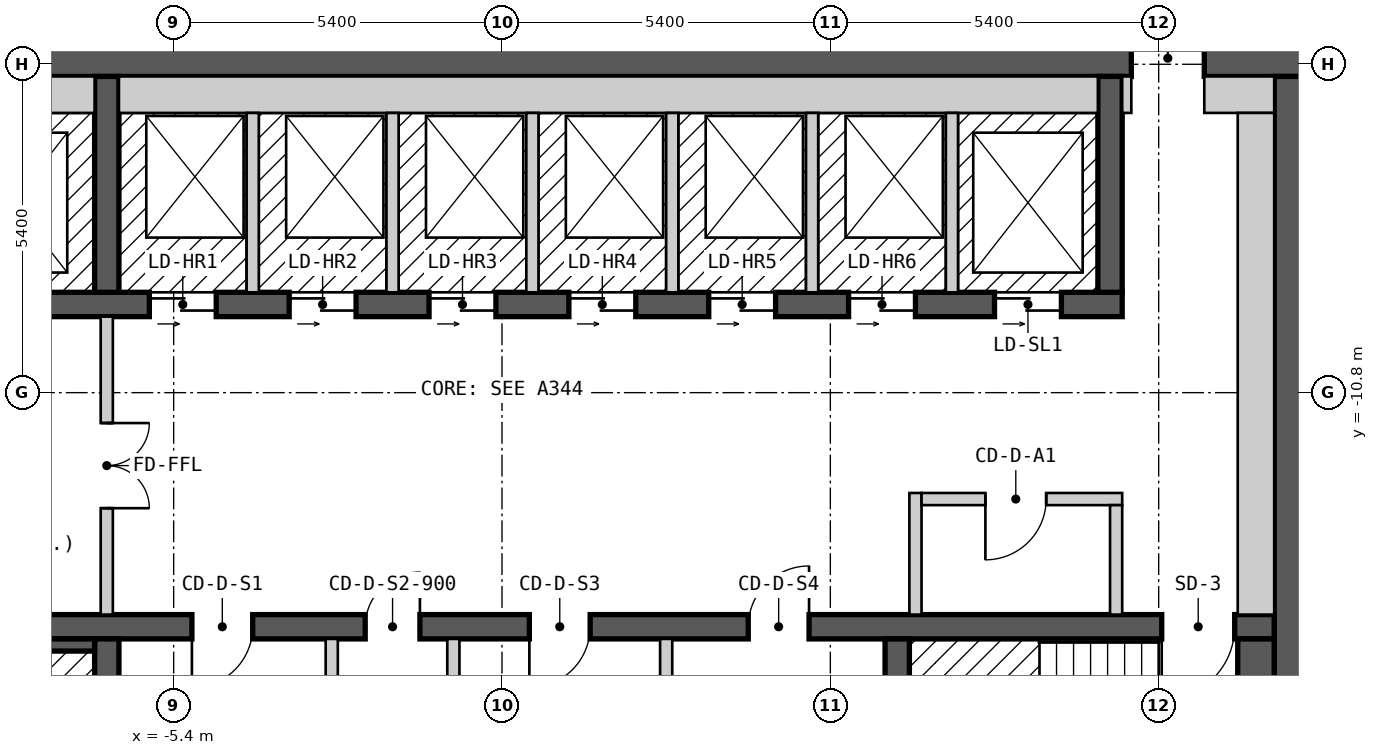
"""IFC4 building model, lengths in metres.
Left out: names, types, materials, properties, quantities, classifications, styles, units other than length and angle.
Written with IfcOpenShell. Run it as: python <this file> out.ifc"""

import sys

from ifc_helpers import new_model, si_unit, direction, frame, frame_2d, origin, place, context, subcontext, project, spatial, rectangle, extrude, element, fill, save


model = new_model("IFC4")
c1 = context("Model", 3, precision=1e-05, world=origin(), true_north=direction((0.0, 1.0)))
c2 = subcontext(c1, "Body", "Model", "MODEL_VIEW")
j1 = project(units=[si_unit("LENGTHUNIT", "METRE"), si_unit("PLANEANGLEUNIT", "RADIAN")], contexts=[c1])
p1 = place(None, origin())
s1 = spatial("IfcSite", under=j1, at=p1, CompositionType="ELEMENT")
p2 = place(p1, origin())
s2 = spatial("IfcBuilding", under=s1, at=p2, CompositionType="ELEMENT")
p3 = place(p2, frame((0.0, 0.0, 163.2)))
s3 = spatial("IfcBuildingStorey", under=s2, at=p3, CompositionType="ELEMENT", Elevation=163.2)
p4 = place(p3, frame((-13.3, -5.3, 0.0), z_axis=(0.0, 0.0, 1.0), x_axis=(1.0, 0.0, 0.0)))
e1 = element("IfcWall", 1, at=p4, inside=s3, PredefinedType="SHEAR", context=c2, shape_type="SweptSolid", body=[
    extrude(rectangle(XDim=26.6, YDim=0.6, at=frame_2d((13.3, 0.0))), origin(), (0.0, 0.0, 1.0), 2.7),
])
p5 = place(p4, frame((23.65, 0.0, 0.0)))
e2 = element("IfcOpeningElement", 2, at=p5, cuts=e1, PredefinedType="OPENING", context=c2, shape_type="SweptSolid", body=[
    extrude(rectangle(XDim=1.2, YDim=2.1, at=frame_2d((0.6, 1.05))), frame((0.0, 0.31, 0.0), z_axis=(0.0, -1.0, 0.0), x_axis=(1.0, 0.0, 0.0)), (0.0, 0.0, 1.0), 0.62),
])
p6 = place(p3, frame((13.0, -18.4, 0.0), z_axis=(0.0, 0.0, 1.0), x_axis=(0.0, 1.0, 0.0)))
e3 = element("IfcWall", 3, at=p6, inside=s3, PredefinedType="SHEAR", context=c2, shape_type="SweptSolid", body=[
    extrude(rectangle(XDim=12.8, YDim=0.6, at=frame_2d((6.4, 0.0))), origin(), (0.0, 0.0, 1.0), 2.7),
])
p7 = place(p3, frame((-12.7, -14.65, 0.0), z_axis=(0.0, 0.0, 1.0), x_axis=(1.0, 0.0, 0.0)))
e4 = element("IfcWall", 4, at=p7, inside=s3, PredefinedType="SHEAR", context=c2, shape_type="SweptSolid", body=[
    extrude(rectangle(XDim=25.4, YDim=0.4, at=frame_2d((12.7, 0.0))), origin(), (0.0, 0.0, 1.0), 2.7),
])
p8 = place(p7, frame((1.9, 0.0, 0.0), z_axis=(0.0, 0.0, 1.0), x_axis=(-1.0, 0.0, 0.0)))
e5 = element("IfcOpeningElement", 5, at=p8, cuts=e4, PredefinedType="OPENING", context=c2, shape_type="SweptSolid", body=[
    extrude(rectangle(XDim=1.2, YDim=2.1, at=frame_2d((0.6, 1.05))), frame((0.0, 0.21, 0.0), z_axis=(0.0, -1.0, 0.0), x_axis=(1.0, 0.0, 0.0)), (0.0, 0.0, 1.0), 0.42),
])
p9 = place(p7, frame((24.75, 0.0, 0.0), z_axis=(0.0, 0.0, 1.0), x_axis=(-1.0, 0.0, 0.0)))
e6 = element("IfcOpeningElement", 6, at=p9, cuts=e4, PredefinedType="OPENING", context=c2, shape_type="SweptSolid", body=[
    extrude(rectangle(XDim=1.2, YDim=2.1, at=frame_2d((0.6, 1.05))), frame((0.0, 0.21, 0.0), z_axis=(0.0, -1.0, 0.0), x_axis=(1.0, 0.0, 0.0)), (0.0, 0.0, 1.0), 0.42),
])
p10 = place(p7, frame((8.6, 0.0, 0.0), z_axis=(0.0, 0.0, 1.0), x_axis=(-1.0, 0.0, 0.0)))
e7 = element("IfcOpeningElement", 7, at=p10, cuts=e4, PredefinedType="OPENING", context=c2, shape_type="SweptSolid", body=[
    extrude(rectangle(XDim=1.0, YDim=2.1, at=frame_2d((0.5, 1.05))), frame((0.0, 0.21, 0.0), z_axis=(0.0, -1.0, 0.0), x_axis=(1.0, 0.0, 0.0)), (0.0, 0.0, 1.0), 0.42),
])
p11 = place(p7, frame((11.35, 0.0, 0.0), z_axis=(0.0, 0.0, 1.0), x_axis=(-1.0, 0.0, 0.0)))
e8 = element("IfcOpeningElement", 8, at=p11, cuts=e4, PredefinedType="OPENING", context=c2, shape_type="SweptSolid", body=[
    extrude(rectangle(XDim=0.9, YDim=2.1, at=frame_2d((0.45, 1.05))), frame((0.0, 0.21, 0.0), z_axis=(0.0, -1.0, 0.0), x_axis=(1.0, 0.0, 0.0)), (0.0, 0.0, 1.0), 0.42),
])
p12 = place(p7, frame((14.15, 0.0, 0.0), z_axis=(0.0, 0.0, 1.0), x_axis=(-1.0, 0.0, 0.0)))
e9 = element("IfcOpeningElement", 9, at=p12, cuts=e4, PredefinedType="OPENING", context=c2, shape_type="SweptSolid", body=[
    extrude(rectangle(XDim=1.0, YDim=2.1, at=frame_2d((0.5, 1.05))), frame((0.0, 0.21, 0.0), z_axis=(0.0, -1.0, 0.0), x_axis=(1.0, 0.0, 0.0)), (0.0, 0.0, 1.0), 0.42),
])
p13 = place(p7, frame((17.75, 0.0, 0.0), z_axis=(0.0, 0.0, 1.0), x_axis=(-1.0, 0.0, 0.0)))
e10 = element("IfcOpeningElement", 10, at=p13, cuts=e4, PredefinedType="OPENING", context=c2, shape_type="SweptSolid", body=[
    extrude(rectangle(XDim=1.0, YDim=2.1, at=frame_2d((0.5, 1.05))), frame((0.0, 0.21, 0.0), z_axis=(0.0, -1.0, 0.0), x_axis=(1.0, 0.0, 0.0)), (0.0, 0.0, 1.0), 0.42),
])
p14 = place(p3, frame((-12.7, -9.35, 0.0), z_axis=(0.0, 0.0, 1.0), x_axis=(1.0, 0.0, 0.0)))
e11 = element("IfcWall", 11, at=p14, inside=s3, PredefinedType="SHEAR", context=c2, shape_type="SweptSolid", body=[
    extrude(rectangle(XDim=22.9, YDim=0.4, at=frame_2d((11.45, 0.0))), origin(), (0.0, 0.0, 1.0), 2.7),
])
p15 = place(p14, frame((1.3, 0.0, 0.0)))
e12 = element("IfcOpeningElement", 12, at=p15, cuts=e11, PredefinedType="OPENING", context=c2, shape_type="SweptSolid", body=[
    extrude(rectangle(XDim=1.1, YDim=2.1, at=frame_2d((0.55, 1.05))), frame((0.0, 0.21, 0.0), z_axis=(0.0, -1.0, 0.0), x_axis=(1.0, 0.0, 0.0)), (0.0, 0.0, 1.0), 0.42),
])
p16 = place(p14, frame((4.1, 0.0, 0.0)))
e13 = element("IfcOpeningElement", 13, at=p16, cuts=e11, PredefinedType="OPENING", context=c2, shape_type="SweptSolid", body=[
    extrude(rectangle(XDim=1.1, YDim=2.1, at=frame_2d((0.55, 1.05))), frame((0.0, 0.21, 0.0), z_axis=(0.0, -1.0, 0.0), x_axis=(1.0, 0.0, 0.0)), (0.0, 0.0, 1.0), 0.42),
])
p17 = place(p14, frame((6.9, 0.0, 0.0)))
e14 = element("IfcOpeningElement", 14, at=p17, cuts=e11, PredefinedType="OPENING", context=c2, shape_type="SweptSolid", body=[
    extrude(rectangle(XDim=1.1, YDim=2.1, at=frame_2d((0.55, 1.05))), frame((0.0, 0.21, 0.0), z_axis=(0.0, -1.0, 0.0), x_axis=(1.0, 0.0, 0.0)), (0.0, 0.0, 1.0), 0.42),
])
p18 = place(p14, frame((9.2, 0.0, 0.0)))
e15 = element("IfcOpeningElement", 15, at=p18, cuts=e11, PredefinedType="OPENING", context=c2, shape_type="SweptSolid", body=[
    extrude(rectangle(XDim=1.1, YDim=2.1, at=frame_2d((0.55, 1.05))), frame((0.0, 0.21, 0.0), z_axis=(0.0, -1.0, 0.0), x_axis=(1.0, 0.0, 0.0)), (0.0, 0.0, 1.0), 0.42),
])
p19 = place(p14, frame((11.5, 0.0, 0.0)))
e16 = element("IfcOpeningElement", 16, at=p19, cuts=e11, PredefinedType="OPENING", context=c2, shape_type="SweptSolid", body=[
    extrude(rectangle(XDim=1.1, YDim=2.1, at=frame_2d((0.55, 1.05))), frame((0.0, 0.21, 0.0), z_axis=(0.0, -1.0, 0.0), x_axis=(1.0, 0.0, 0.0)), (0.0, 0.0, 1.0), 0.42),
])
p20 = place(p14, frame((13.8, 0.0, 0.0)))
e17 = element("IfcOpeningElement", 17, at=p20, cuts=e11, PredefinedType="OPENING", context=c2, shape_type="SweptSolid", body=[
    extrude(rectangle(XDim=1.1, YDim=2.1, at=frame_2d((0.55, 1.05))), frame((0.0, 0.21, 0.0), z_axis=(0.0, -1.0, 0.0), x_axis=(1.0, 0.0, 0.0)), (0.0, 0.0, 1.0), 0.42),
])
p21 = place(p14, frame((16.1, 0.0, 0.0)))
e18 = element("IfcOpeningElement", 18, at=p21, cuts=e11, PredefinedType="OPENING", context=c2, shape_type="SweptSolid", body=[
    extrude(rectangle(XDim=1.1, YDim=2.1, at=frame_2d((0.55, 1.05))), frame((0.0, 0.21, 0.0), z_axis=(0.0, -1.0, 0.0), x_axis=(1.0, 0.0, 0.0)), (0.0, 0.0, 1.0), 0.42),
])
p22 = place(p14, frame((18.4, 0.0, 0.0)))
e19 = element("IfcOpeningElement", 19, at=p22, cuts=e11, PredefinedType="OPENING", context=c2, shape_type="SweptSolid", body=[
    extrude(rectangle(XDim=1.1, YDim=2.1, at=frame_2d((0.55, 1.05))), frame((0.0, 0.21, 0.0), z_axis=(0.0, -1.0, 0.0), x_axis=(1.0, 0.0, 0.0)), (0.0, 0.0, 1.0), 0.42),
])
p23 = place(p14, frame((20.8, 0.0, 0.0)))
e20 = element("IfcOpeningElement", 20, at=p23, cuts=e11, PredefinedType="OPENING", context=c2, shape_type="SweptSolid", body=[
    extrude(rectangle(XDim=1.1, YDim=2.1, at=frame_2d((0.55, 1.05))), frame((0.0, 0.21, 0.0), z_axis=(0.0, -1.0, 0.0), x_axis=(1.0, 0.0, 0.0)), (0.0, 0.0, 1.0), 0.42),
])
for number, where, z_axis, x_axis in (
    (21, (-6.5, -18.4, 0.0), (0.0, 0.0, 1.0), (0.0, 1.0, 0.0)),
    (22, (6.5, -18.4, 0.0), (0.0, 0.0, 1.0), (0.0, 1.0, 0.0)),
    (23, (-6.5, -9.15, 0.0), (0.0, 0.0, 1.0), (0.0, 1.0, 0.0)),
    (24, (10.0, -9.15, 0.0), (0.0, 0.0, 1.0), (0.0, 1.0, 0.0)),
):
    element("IfcWall", number, at=place(p3, frame(where, z_axis=z_axis, x_axis=x_axis)), inside=s3, PredefinedType="SHEAR", context=c2, shape_type="SweptSolid", body=[
        extrude(rectangle(XDim=3.55, YDim=0.4, at=frame_2d((1.775, 0.0))), origin(), (0.0, 0.0, 1.0), 2.7),
    ])
p24 = place(p3, frame((-12.1, -5.9, 0.0), z_axis=(0.0, 0.0, 1.0), x_axis=(1.0, 0.0, 0.0)))
e25 = element("IfcWall", 25, at=p24, inside=s3, PredefinedType="SOLIDWALL", context=c2, shape_type="SweptSolid", body=[
    extrude(rectangle(XDim=5.4, YDim=0.6, at=frame_2d((2.7, 0.0))), origin(), (0.0, 0.0, 1.0), 2.7),
])
p25 = place(p3, frame((-10.8, -14.95, 0.0), z_axis=(0.0, 0.0, 1.0), x_axis=(1.0, 0.0, 0.0)))
e26 = element("IfcWall", 26, at=p25, inside=s3, PredefinedType="SOLIDWALL", context=c2, shape_type="SweptSolid", body=[
    extrude(rectangle(XDim=4.1, YDim=0.2, at=frame_2d((2.05, 0.0))), origin(), (0.0, 0.0, 1.0), 2.7),
])
p26 = place(p3, frame((-6.5, -14.45, 0.0), z_axis=(0.0, 0.0, 1.0), x_axis=(0.0, 1.0, 0.0)))
e27 = element("IfcWall", 27, at=p26, inside=s3, PredefinedType="PARTITIONING", context=c2, shape_type="SweptSolid", body=[
    extrude(rectangle(XDim=4.9, YDim=0.2, at=frame_2d((2.45, 0.0))), origin(), (0.0, 0.0, 1.0), 2.7),
])
p27 = place(p26, frame((3.15, 0.0, 0.0), z_axis=(0.0, 0.0, 1.0), x_axis=(-1.0, 0.0, 0.0)))
e28 = element("IfcOpeningElement", 28, at=p27, cuts=e27, PredefinedType="OPENING", context=c2, shape_type="SweptSolid", body=[
    extrude(rectangle(XDim=1.4, YDim=2.1, at=frame_2d((0.7, 1.05))), frame((0.0, 0.11, 0.0), z_axis=(0.0, -1.0, 0.0), x_axis=(1.0, 0.0, 0.0)), (0.0, 0.0, 1.0), 0.22),
])
p28 = place(p3, frame((-6.3, -5.9, 0.0), z_axis=(0.0, 0.0, 1.0), x_axis=(1.0, 0.0, 0.0)))
e29 = element("IfcWall", 29, at=p28, inside=s3, PredefinedType="SOLIDWALL", context=c2, shape_type="SweptSolid", body=[
    extrude(rectangle(XDim=16.1, YDim=0.6, at=frame_2d((8.05, 0.0))), origin(), (0.0, 0.0, 1.0), 2.7),
])
p29 = place(p3, frame((-4.1, -9.15, 0.0), z_axis=(0.0, 0.0, 1.0), x_axis=(0.0, 1.0, 0.0)))
e30 = element("IfcWall", 30, at=p29, inside=s3, PredefinedType="SOLIDWALL", context=c2, shape_type="SweptSolid", body=[
    extrude(rectangle(XDim=2.95, YDim=0.2, at=frame_2d((1.475, 0.0))), origin(), (0.0, 0.0, 1.0), 2.7),
])
p30 = place(p3, frame((-2.8, -17.8, 0.0), z_axis=(0.0, 0.0, 1.0), x_axis=(0.0, 1.0, 0.0)))
e31 = element("IfcWall", 31, at=p30, inside=s3, PredefinedType="PARTITIONING", context=c2, shape_type="SweptSolid", body=[
    extrude(rectangle(XDim=2.95, YDim=0.2, at=frame_2d((1.475, 0.0))), origin(), (0.0, 0.0, 1.0), 2.7),
])
p31 = place(p3, frame((-1.8, -9.15, 0.0), z_axis=(0.0, 0.0, 1.0), x_axis=(0.0, 1.0, 0.0)))
e32 = element("IfcWall", 32, at=p31, inside=s3, PredefinedType="SOLIDWALL", context=c2, shape_type="SweptSolid", body=[
    extrude(rectangle(XDim=2.95, YDim=0.2, at=frame_2d((1.475, 0.0))), origin(), (0.0, 0.0, 1.0), 2.7),
])
p32 = place(p3, frame((-0.8, -17.8, 0.0), z_axis=(0.0, 0.0, 1.0), x_axis=(0.0, 1.0, 0.0)))
e33 = element("IfcWall", 33, at=p32, inside=s3, PredefinedType="PARTITIONING", context=c2, shape_type="SweptSolid", body=[
    extrude(rectangle(XDim=2.95, YDim=0.2, at=frame_2d((1.475, 0.0))), origin(), (0.0, 0.0, 1.0), 2.7),
])
p33 = place(p3, frame((0.5, -9.15, 0.0), z_axis=(0.0, 0.0, 1.0), x_axis=(0.0, 1.0, 0.0)))
e34 = element("IfcWall", 34, at=p33, inside=s3, PredefinedType="SOLIDWALL", context=c2, shape_type="SweptSolid", body=[
    extrude(rectangle(XDim=2.95, YDim=0.2, at=frame_2d((1.475, 0.0))), origin(), (0.0, 0.0, 1.0), 2.7),
])
p34 = place(p3, frame((2.7, -17.8, 0.0), z_axis=(0.0, 0.0, 1.0), x_axis=(0.0, 1.0, 0.0)))
e35 = element("IfcWall", 35, at=p34, inside=s3, PredefinedType="PARTITIONING", context=c2, shape_type="SweptSolid", body=[
    extrude(rectangle(XDim=2.95, YDim=0.2, at=frame_2d((1.475, 0.0))), origin(), (0.0, 0.0, 1.0), 2.7),
])
for number, where, z_axis, x_axis in (
    (36, (2.8, -9.15, 0.0), (0.0, 0.0, 1.0), (0.0, 1.0, 0.0)),
    (37, (5.1, -9.15, 0.0), (0.0, 0.0, 1.0), (0.0, 1.0, 0.0)),
):
    element("IfcWall", number, at=place(p3, frame(where, z_axis=z_axis, x_axis=x_axis)), inside=s3, PredefinedType="SOLIDWALL", context=c2, shape_type="SweptSolid", body=[
        extrude(rectangle(XDim=2.95, YDim=0.2, at=frame_2d((1.475, 0.0))), origin(), (0.0, 0.0, 1.0), 2.7),
    ])
p35 = place(p3, frame((6.8, -14.45, 0.0), z_axis=(0.0, 0.0, 1.0), x_axis=(0.0, 1.0, 0.0)))
e38 = element("IfcWall", 38, at=p35, inside=s3, PredefinedType="PARTITIONING", context=c2, shape_type="SweptSolid", body=[
    extrude(rectangle(XDim=2.0, YDim=0.2, at=frame_2d((1.0, 0.0))), origin(), (0.0, 0.0, 1.0), 2.7),
])
p36 = place(p3, frame((6.9, -12.55, 0.0), z_axis=(0.0, 0.0, 1.0), x_axis=(1.0, 0.0, 0.0)))
e39 = element("IfcWall", 39, at=p36, inside=s3, PredefinedType="PARTITIONING", context=c2, shape_type="SweptSolid", body=[
    extrude(rectangle(XDim=3.3, YDim=0.2, at=frame_2d((1.65, 0.0))), origin(), (0.0, 0.0, 1.0), 2.7),
])
p37 = place(p36, frame((2.05, 0.0, 0.0), z_axis=(0.0, 0.0, 1.0), x_axis=(-1.0, 0.0, 0.0)))
e40 = element("IfcOpeningElement", 40, at=p37, cuts=e39, PredefinedType="OPENING", context=c2, shape_type="SweptSolid", body=[
    extrude(rectangle(XDim=1.0, YDim=2.1, at=frame_2d((0.5, 1.05))), frame((0.0, 0.11, 0.0), z_axis=(0.0, -1.0, 0.0), x_axis=(1.0, 0.0, 0.0)), (0.0, 0.0, 1.0), 0.22),
])
p38 = place(p3, frame((7.4, -9.15, 0.0), z_axis=(0.0, 0.0, 1.0), x_axis=(0.0, 1.0, 0.0)))
e41 = element("IfcWall", 41, at=p38, inside=s3, PredefinedType="SOLIDWALL", context=c2, shape_type="SweptSolid", body=[
    extrude(rectangle(XDim=2.95, YDim=0.2, at=frame_2d((1.475, 0.0))), origin(), (0.0, 0.0, 1.0), 2.7),
])
p39 = place(p3, frame((10.1, -14.45, 0.0), z_axis=(0.0, 0.0, 1.0), x_axis=(0.0, 1.0, 0.0)))
e42 = element("IfcWall", 42, at=p39, inside=s3, PredefinedType="PARTITIONING", context=c2, shape_type="SweptSolid", body=[
    extrude(rectangle(XDim=1.8, YDim=0.2, at=frame_2d((0.9, 0.0))), origin(), (0.0, 0.0, 1.0), 2.7),
])
p40 = place(p3, frame((10.275, -6.2, 0.0), z_axis=(0.0, 0.0, 1.0), x_axis=(0.0, 1.0, 0.0)))
e43 = element("IfcWall", 43, at=p40, inside=s3, PredefinedType="PARTITIONING", context=c2, shape_type="SweptSolid", body=[
    extrude(rectangle(XDim=0.6, YDim=0.15, at=frame_2d((0.3, 0.0))), origin(), (0.0, 0.0, 1.0), 2.7),
])
p41 = place(p3, frame((11.55, -5.9, 0.0), z_axis=(0.0, 0.0, 1.0), x_axis=(1.0, 0.0, 0.0)))
e44 = element("IfcWall", 44, at=p41, inside=s3, PredefinedType="PARTITIONING", context=c2, shape_type="SweptSolid", body=[
    extrude(rectangle(XDim=1.15, YDim=0.6, at=frame_2d((0.575, 0.0))), origin(), (0.0, 0.0, 1.0), 2.7),
])
p42 = place(p3, frame((12.4, -17.6, 0.0), z_axis=(0.0, 0.0, 1.0), x_axis=(0.0, 1.0, 0.0)))
e45 = element("IfcWall", 45, at=p42, inside=s3, PredefinedType="SOLIDWALL", context=c2, shape_type="SweptSolid", body=[
    extrude(rectangle(XDim=2.75, YDim=0.6, at=frame_2d((1.375, 0.0))), origin(), (0.0, 0.0, 1.0), 2.7),
])
p43 = place(p3, frame((12.4, -14.45, 0.0), z_axis=(0.0, 0.0, 1.0), x_axis=(0.0, 1.0, 0.0)))
e46 = element("IfcWall", 46, at=p43, inside=s3, PredefinedType="PARTITIONING", context=c2, shape_type="SweptSolid", body=[
    extrude(rectangle(XDim=8.25, YDim=0.6, at=frame_2d((4.125, 0.0))), origin(), (0.0, 0.0, 1.0), 2.7),
])
p44 = place(p17, origin())
e47 = element("IfcDoor", 47, at=p44, inside=s3, OperationType="DOUBLE_DOOR_SLIDING", PredefinedType="DOOR", context=c2, shape_type="SweptSolid", body=[
    extrude(rectangle(XDim=1.1, YDim=2.1, at=frame_2d((0.55, 1.05))), frame((0.0, 0.025, 0.0), z_axis=(0.0, -1.0, 0.0), x_axis=(1.0, 0.0, 0.0)), (0.0, 0.0, 1.0), 0.05),
])
fill(e14, e47)
p45 = place(p18, origin())
e48 = element("IfcDoor", 48, at=p45, inside=s3, OperationType="DOUBLE_DOOR_SLIDING", PredefinedType="DOOR", context=c2, shape_type="SweptSolid", body=[
    extrude(rectangle(XDim=1.1, YDim=2.1, at=frame_2d((0.55, 1.05))), frame((0.0, 0.025, 0.0), z_axis=(0.0, -1.0, 0.0), x_axis=(1.0, 0.0, 0.0)), (0.0, 0.0, 1.0), 0.05),
])
fill(e15, e48)
p46 = place(p19, origin())
e49 = element("IfcDoor", 49, at=p46, inside=s3, OperationType="DOUBLE_DOOR_SLIDING", PredefinedType="DOOR", context=c2, shape_type="SweptSolid", body=[
    extrude(rectangle(XDim=1.1, YDim=2.1, at=frame_2d((0.55, 1.05))), frame((0.0, 0.025, 0.0), z_axis=(0.0, -1.0, 0.0), x_axis=(1.0, 0.0, 0.0)), (0.0, 0.0, 1.0), 0.05),
])
fill(e16, e49)
p47 = place(p20, origin())
e50 = element("IfcDoor", 50, at=p47, inside=s3, OperationType="DOUBLE_DOOR_SLIDING", PredefinedType="DOOR", context=c2, shape_type="SweptSolid", body=[
    extrude(rectangle(XDim=1.1, YDim=2.1, at=frame_2d((0.55, 1.05))), frame((0.0, 0.025, 0.0), z_axis=(0.0, -1.0, 0.0), x_axis=(1.0, 0.0, 0.0)), (0.0, 0.0, 1.0), 0.05),
])
fill(e17, e50)
p48 = place(p21, origin())
e51 = element("IfcDoor", 51, at=p48, inside=s3, OperationType="DOUBLE_DOOR_SLIDING", PredefinedType="DOOR", context=c2, shape_type="SweptSolid", body=[
    extrude(rectangle(XDim=1.1, YDim=2.1, at=frame_2d((0.55, 1.05))), frame((0.0, 0.025, 0.0), z_axis=(0.0, -1.0, 0.0), x_axis=(1.0, 0.0, 0.0)), (0.0, 0.0, 1.0), 0.05),
])
fill(e18, e51)
p49 = place(p22, origin())
e52 = element("IfcDoor", 52, at=p49, inside=s3, OperationType="DOUBLE_DOOR_SLIDING", PredefinedType="DOOR", context=c2, shape_type="SweptSolid", body=[
    extrude(rectangle(XDim=1.1, YDim=2.1, at=frame_2d((0.55, 1.05))), frame((0.0, 0.025, 0.0), z_axis=(0.0, -1.0, 0.0), x_axis=(1.0, 0.0, 0.0)), (0.0, 0.0, 1.0), 0.05),
])
fill(e19, e52)
p50 = place(p23, origin())
e53 = element("IfcDoor", 53, at=p50, inside=s3, OperationType="DOUBLE_DOOR_SLIDING", PredefinedType="DOOR", context=c2, shape_type="SweptSolid", body=[
    extrude(rectangle(XDim=1.1, YDim=2.1, at=frame_2d((0.55, 1.05))), frame((0.0, 0.025, 0.0), z_axis=(0.0, -1.0, 0.0), x_axis=(1.0, 0.0, 0.0)), (0.0, 0.0, 1.0), 0.05),
])
fill(e20, e53)
p51 = place(p9, origin())
e54 = element("IfcDoor", 54, at=p51, inside=s3, OperationType="SINGLE_SWING_RIGHT", PredefinedType="DOOR", context=c2, shape_type="SweptSolid", body=[
    extrude(rectangle(XDim=1.2, YDim=2.1, at=frame_2d((0.6, 1.05))), frame((0.0, 0.025, 0.0), z_axis=(0.0, -1.0, 0.0), x_axis=(1.0, 0.0, 0.0)), (0.0, 0.0, 1.0), 0.05),
])
fill(e6, e54)
p52 = place(p27, origin())
e55 = element("IfcDoor", 55, at=p52, inside=s3, OperationType="DOUBLE_DOOR_SINGLE_SWING", PredefinedType="DOOR", context=c2, shape_type="SweptSolid", body=[
    extrude(rectangle(XDim=1.4, YDim=2.1, at=frame_2d((0.7, 1.05))), frame((0.0, 0.025, 0.0), z_axis=(0.0, -1.0, 0.0), x_axis=(1.0, 0.0, 0.0)), (0.0, 0.0, 1.0), 0.05),
])
fill(e28, e55)
p53 = place(p5, origin())
e56 = element("IfcDoor", 56, at=p53, inside=s3, OperationType="DOUBLE_DOOR_SINGLE_SWING", PredefinedType="DOOR", context=c2, shape_type="SweptSolid", body=[
    extrude(rectangle(XDim=1.2, YDim=2.1, at=frame_2d((0.6, 1.05))), frame((0.0, 0.025, 0.0), z_axis=(0.0, -1.0, 0.0), x_axis=(1.0, 0.0, 0.0)), (0.0, 0.0, 1.0), 0.05),
])
fill(e2, e56)
p54 = place(p37, origin())
e57 = element("IfcDoor", 57, at=p54, inside=s3, OperationType="SINGLE_SWING_RIGHT", PredefinedType="DOOR", context=c2, shape_type="SweptSolid", body=[
    extrude(rectangle(XDim=1.0, YDim=2.1, at=frame_2d((0.5, 1.05))), frame((0.0, 0.025, 0.0), z_axis=(0.0, -1.0, 0.0), x_axis=(1.0, 0.0, 0.0)), (0.0, 0.0, 1.0), 0.05),
])
fill(e40, e57)
p55 = place(p10, origin())
e58 = element("IfcDoor", 58, at=p55, inside=s3, OperationType="SINGLE_SWING_RIGHT", PredefinedType="DOOR", context=c2, shape_type="SweptSolid", body=[
    extrude(rectangle(XDim=1.0, YDim=2.1, at=frame_2d((0.5, 1.05))), frame((0.0, 0.025, 0.0), z_axis=(0.0, -1.0, 0.0), x_axis=(1.0, 0.0, 0.0)), (0.0, 0.0, 1.0), 0.05),
])
fill(e7, e58)
p56 = place(p11, origin())
e59 = element("IfcDoor", 59, at=p56, inside=s3, OperationType="SINGLE_SWING_LEFT", PredefinedType="DOOR", context=c2, shape_type="SweptSolid", body=[
    extrude(rectangle(XDim=0.9, YDim=2.1, at=frame_2d((0.45, 1.05))), frame((0.0, 0.025, 0.0), z_axis=(0.0, -1.0, 0.0), x_axis=(1.0, 0.0, 0.0)), (0.0, 0.0, 1.0), 0.05),
])
fill(e8, e59)
p57 = place(p12, origin())
e60 = element("IfcDoor", 60, at=p57, inside=s3, OperationType="SINGLE_SWING_RIGHT", PredefinedType="DOOR", context=c2, shape_type="SweptSolid", body=[
    extrude(rectangle(XDim=1.0, YDim=2.1, at=frame_2d((0.5, 1.05))), frame((0.0, 0.025, 0.0), z_axis=(0.0, -1.0, 0.0), x_axis=(1.0, 0.0, 0.0)), (0.0, 0.0, 1.0), 0.05),
])
fill(e9, e60)
p58 = place(p13, origin())
e61 = element("IfcDoor", 61, at=p58, inside=s3, OperationType="SINGLE_SWING_LEFT", PredefinedType="DOOR", context=c2, shape_type="SweptSolid", body=[
    extrude(rectangle(XDim=1.0, YDim=2.1, at=frame_2d((0.5, 1.05))), frame((0.0, 0.025, 0.0), z_axis=(0.0, -1.0, 0.0), x_axis=(1.0, 0.0, 0.0)), (0.0, 0.0, 1.0), 0.05),
])
fill(e10, e61)
save(model, sys.argv[1])
